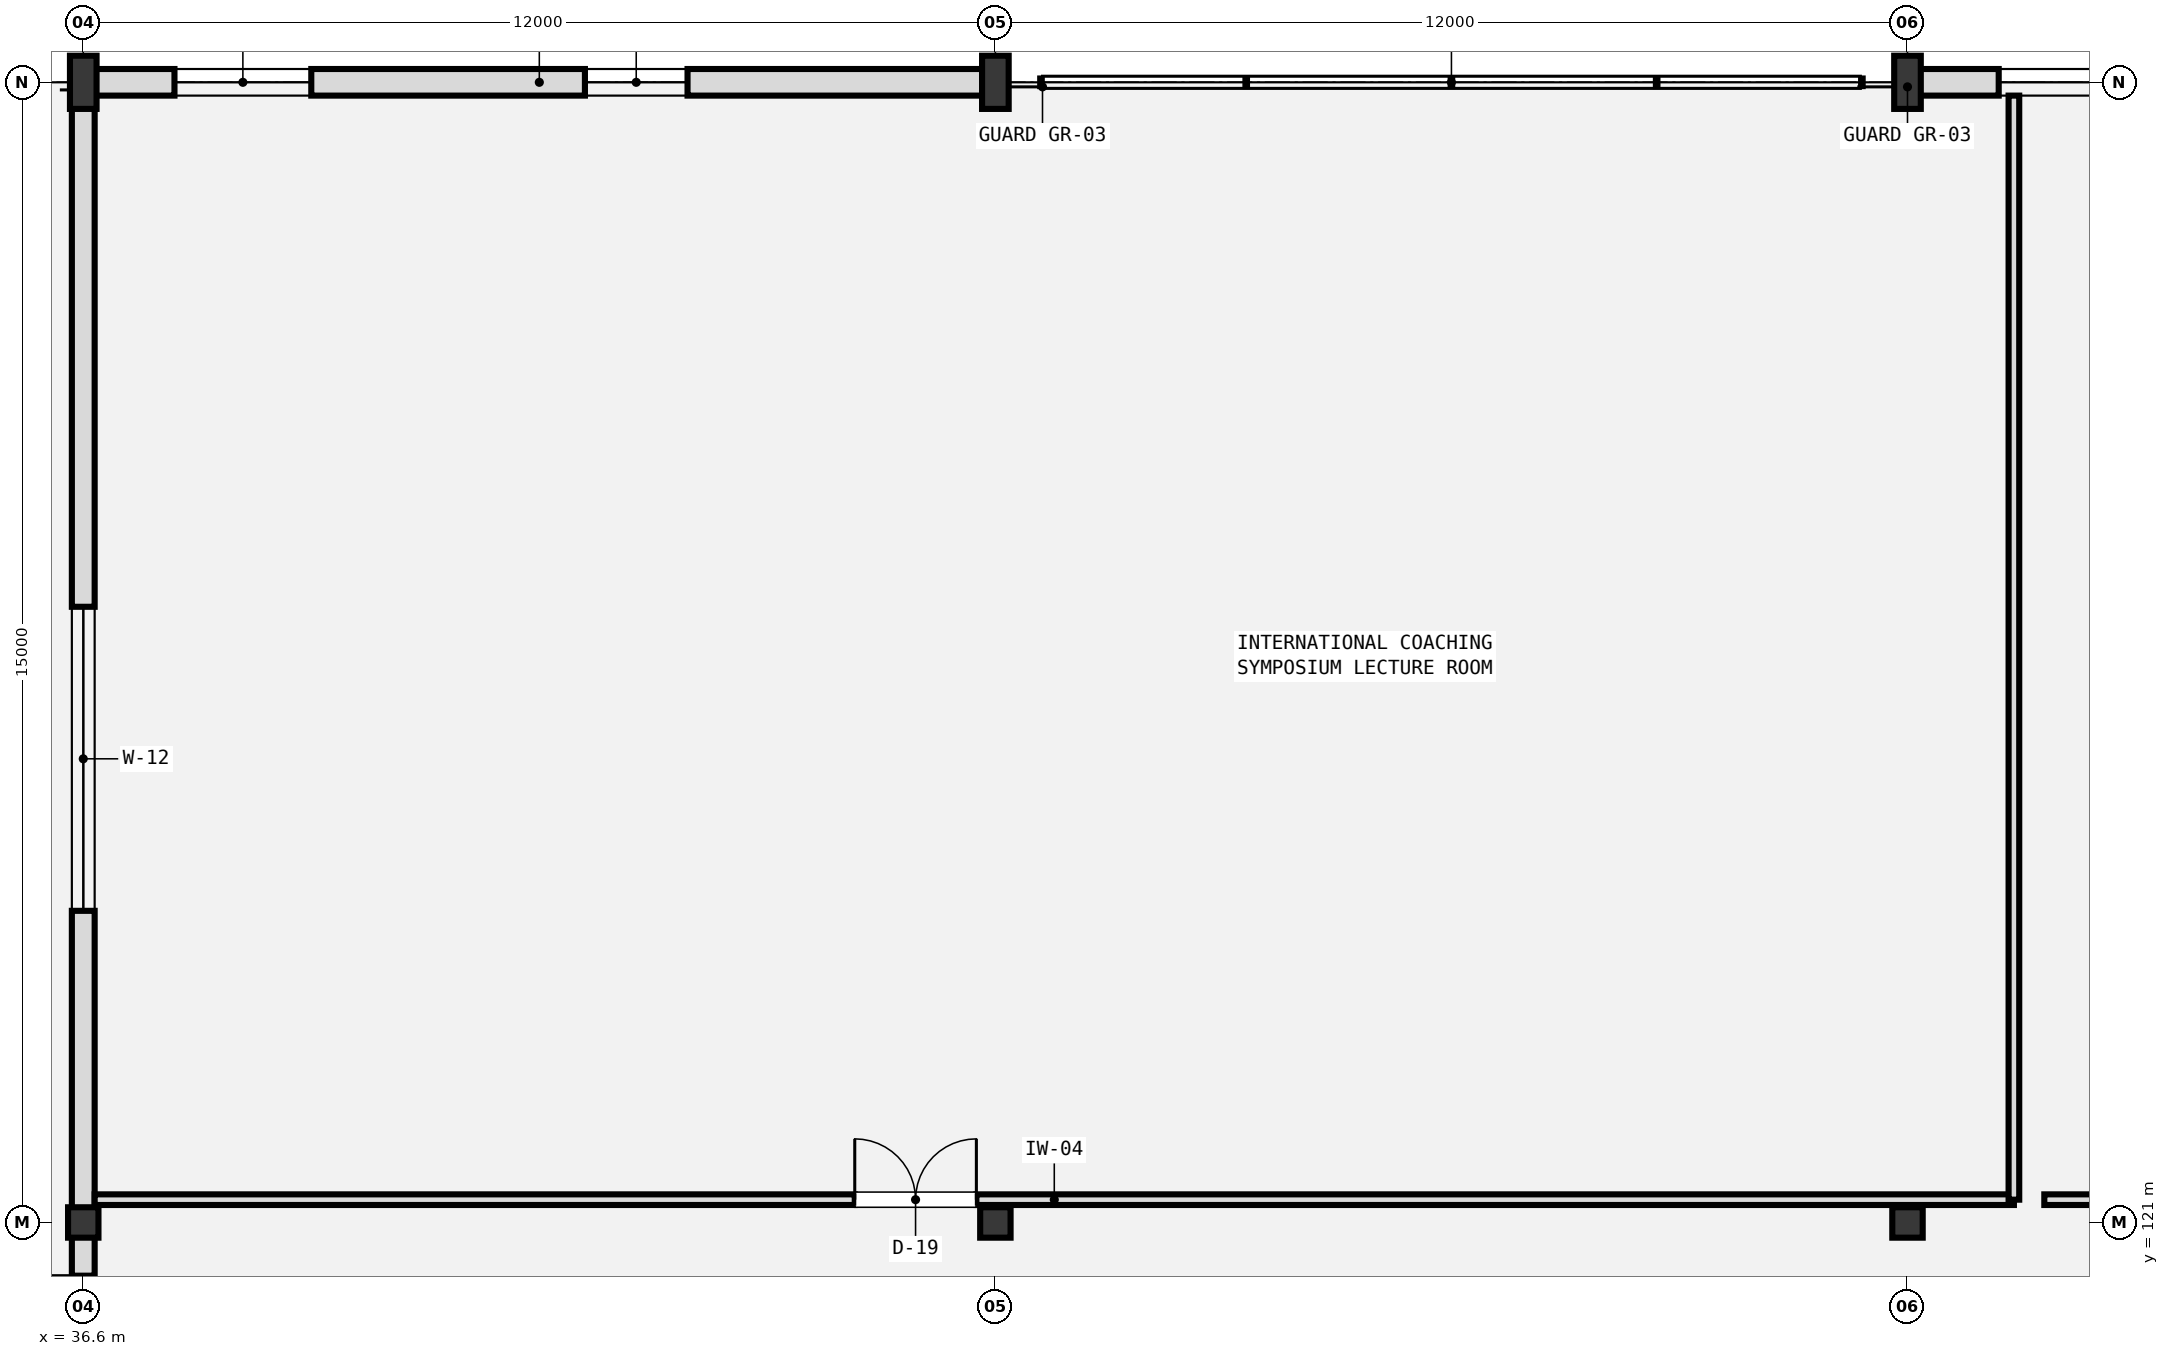
"""IFC4 building model, lengths in metres.
Left out: names, types, materials, properties, quantities, classifications, styles, units other than length and angle.
Written with IfcOpenShell. Run it as: python <this file> out.ifc"""

import sys

from ifc_helpers import new_model, si_unit, direction, frame, frame_2d, origin, origin_2d, place, context, subcontext, project, spatial, rectangle, extrude, element, fill, save


model = new_model("IFC4")
c1 = context("Model", 3, precision=1e-05, world=origin(), true_north=direction((0.0, 1.0)))
c2 = subcontext(c1, "Body", "Model", "MODEL_VIEW")
j1 = project(units=[si_unit("LENGTHUNIT", "METRE"), si_unit("PLANEANGLEUNIT", "RADIAN")], contexts=[c1])
p1 = place(None, origin())
s1 = spatial("IfcSite", under=j1, at=p1, CompositionType="ELEMENT")
p2 = place(p1, origin())
s2 = spatial("IfcBuilding", under=s1, at=p2, CompositionType="ELEMENT")
p3 = place(p2, frame((0.0, 0.0, 14.4)))
s3 = spatial("IfcBuildingStorey", under=s2, at=p3, CompositionType="ELEMENT", Elevation=14.4)
p4 = place(p3, frame((36.6, 121.0, 0.0), z_axis=(0.0, 0.0, 1.0), x_axis=(1.0, 0.0, 0.0)))
e1 = element("IfcColumn", 1, at=p4, inside=s3, PredefinedType="COLUMN", context=c2, shape_type="SweptSolid", body=[
    extrude(rectangle(XDim=0.4, YDim=0.4, at=origin_2d()), origin(), (0.0, 0.0, 1.0), 3.86),
])
p5 = place(p3, frame((36.6, 136.0, 0.0), z_axis=(0.0, 0.0, 1.0), x_axis=(1.0, 0.0, 0.0)))
e2 = element("IfcColumn", 2, at=p5, inside=s3, PredefinedType="COLUMN", context=c2, shape_type="SweptSolid", body=[
    extrude(rectangle(XDim=0.35, YDim=0.7, at=origin_2d()), origin(), (0.0, 0.0, 1.0), 3.86),
])
p6 = place(p3, frame((48.6, 121.0, 0.0), z_axis=(0.0, 0.0, 1.0), x_axis=(1.0, 0.0, 0.0)))
e3 = element("IfcColumn", 3, at=p6, inside=s3, PredefinedType="COLUMN", context=c2, shape_type="SweptSolid", body=[
    extrude(rectangle(XDim=0.4, YDim=0.4, at=origin_2d()), origin(), (0.0, 0.0, 1.0), 4.2),
])
p7 = place(p3, frame((48.6, 136.0, 0.0), z_axis=(0.0, 0.0, 1.0), x_axis=(1.0, 0.0, 0.0)))
e4 = element("IfcColumn", 4, at=p7, inside=s3, PredefinedType="COLUMN", context=c2, shape_type="SweptSolid", body=[
    extrude(rectangle(XDim=0.35, YDim=0.7, at=origin_2d()), origin(), (0.0, 0.0, 1.0), 4.2),
])
p8 = place(p3, frame((60.6, 121.0, 0.0), z_axis=(0.0, 0.0, 1.0), x_axis=(1.0, 0.0, 0.0)))
e5 = element("IfcColumn", 5, at=p8, inside=s3, PredefinedType="COLUMN", context=c2, shape_type="SweptSolid", body=[
    extrude(rectangle(XDim=0.4, YDim=0.4, at=origin_2d()), origin(), (0.0, 0.0, 1.0), 4.2),
])
p9 = place(p3, frame((60.6, 136.0, 0.0), z_axis=(0.0, 0.0, 1.0), x_axis=(1.0, 0.0, 0.0)))
e6 = element("IfcColumn", 6, at=p9, inside=s3, PredefinedType="COLUMN", context=c2, shape_type="SweptSolid", body=[
    extrude(rectangle(XDim=0.35, YDim=0.7, at=origin_2d()), origin(), (0.0, 0.0, 1.0), 4.2),
])
p10 = place(p3, frame((36.6, 136.0, 0.0), z_axis=(0.0, 0.0, 1.0), x_axis=(1.0, 0.0, 0.0)))
e7 = element("IfcWall", 7, at=p10, inside=s3, PredefinedType="SOLIDWALL", context=c2, shape_type="SweptSolid", body=[
    extrude(rectangle(XDim=12.0, YDim=0.35, at=frame_2d((6.0, 0.0))), origin(), (0.0, 0.0, 1.0), 3.51),
])
p11 = place(p10, frame((1.2, 0.0, 0.95)))
e8 = element("IfcOpeningElement", 8, at=p11, cuts=e7, PredefinedType="OPENING", context=c2, shape_type="SweptSolid", body=[
    extrude(rectangle(XDim=1.8, YDim=1.65, at=frame_2d((0.9, 0.825))), frame((0.0, 0.185, 0.0), z_axis=(0.0, -1.0, 0.0), x_axis=(1.0, 0.0, 0.0)), (0.0, 0.0, 1.0), 0.37),
])
p12 = place(p10, frame((6.6, 0.0, 0.95)))
e9 = element("IfcOpeningElement", 9, at=p12, cuts=e7, PredefinedType="OPENING", context=c2, shape_type="SweptSolid", body=[
    extrude(rectangle(XDim=1.35, YDim=1.65, at=frame_2d((0.675, 0.825))), frame((0.0, 0.185, 0.0), z_axis=(0.0, -1.0, 0.0), x_axis=(1.0, 0.0, 0.0)), (0.0, 0.0, 1.0), 0.37),
])
p13 = place(p3, frame((60.6, 136.0, 0.0), z_axis=(0.0, 0.0, 1.0), x_axis=(1.0, 0.0, 0.0)))
e10 = element("IfcWall", 10, at=p13, inside=s3, PredefinedType="SOLIDWALL", context=c2, shape_type="SweptSolid", body=[
    extrude(rectangle(XDim=12.0, YDim=0.35, at=frame_2d((6.0, 0.0))), origin(), (0.0, 0.0, 1.0), 3.51),
])
p14 = place(p13, frame((1.2, 0.0, 0.95)))
e11 = element("IfcOpeningElement", 11, at=p14, cuts=e10, PredefinedType="OPENING", context=c2, shape_type="SweptSolid", body=[
    extrude(rectangle(XDim=4.4, YDim=1.4, at=frame_2d((2.2, 0.7))), frame((0.0, 0.185, 0.0), z_axis=(0.0, -1.0, 0.0), x_axis=(1.0, 0.0, 0.0)), (0.0, 0.0, 1.0), 0.37),
])
p15 = place(p13, frame((6.6, 0.0, 0.95)))
e12 = element("IfcOpeningElement", 12, at=p15, cuts=e10, PredefinedType="OPENING", context=c2, shape_type="SweptSolid", body=[
    extrude(rectangle(XDim=3.4, YDim=1.4, at=frame_2d((1.7, 0.7))), frame((0.0, 0.185, 0.0), z_axis=(0.0, -1.0, 0.0), x_axis=(1.0, 0.0, 0.0)), (0.0, 0.0, 1.0), 0.37),
])
p16 = place(p3, frame((36.6, 108.6, 0.0), z_axis=(0.0, 0.0, 1.0), x_axis=(0.0, 1.0, 0.0)))
e13 = element("IfcWall", 13, at=p16, inside=s3, PredefinedType="SOLIDWALL", context=c2, shape_type="SweptSolid", body=[
    extrude(rectangle(XDim=27.4, YDim=0.3, at=frame_2d((13.7, 0.0))), origin(), (0.0, 0.0, 1.0), 3.36),
])
p17 = place(p16, frame((10.2, 0.0, 0.0)))
e14 = element("IfcOpeningElement", 14, at=p17, cuts=e13, PredefinedType="OPENING", context=c2, shape_type="SweptSolid", body=[
    extrude(rectangle(XDim=1.5, YDim=2.2, at=frame_2d((0.75, 1.1))), frame((0.0, 0.16, 0.0), z_axis=(0.0, -1.0, 0.0), x_axis=(1.0, 0.0, 0.0)), (0.0, 0.0, 1.0), 0.32),
])
p18 = place(p16, frame((2.5, 0.0, 0.85)))
e15 = element("IfcOpeningElement", 15, at=p18, cuts=e13, PredefinedType="OPENING", context=c2, shape_type="SweptSolid", body=[
    extrude(rectangle(XDim=2.8, YDim=1.5, at=frame_2d((1.4, 0.75))), frame((0.0, 0.16, 0.0), z_axis=(0.0, -1.0, 0.0), x_axis=(1.0, 0.0, 0.0)), (0.0, 0.0, 1.0), 0.32),
])
p19 = place(p16, frame((16.5, 0.0, 0.85)))
e16 = element("IfcOpeningElement", 16, at=p19, cuts=e13, PredefinedType="OPENING", context=c2, shape_type="SweptSolid", body=[
    extrude(rectangle(XDim=4.0, YDim=1.5, at=frame_2d((2.0, 0.75))), frame((0.0, 0.16, 0.0), z_axis=(0.0, -1.0, 0.0), x_axis=(1.0, 0.0, 0.0)), (0.0, 0.0, 1.0), 0.32),
])
p20 = place(p3, frame((36.75, 121.3, 0.0), z_axis=(0.0, 0.0, 1.0), x_axis=(1.0, 0.0, 0.0)))
e17 = element("IfcWall", 17, at=p20, inside=s3, PredefinedType="PARTITIONING", context=c2, shape_type="SweptSolid", body=[
    extrude(rectangle(XDim=25.25, YDim=0.14, at=frame_2d((12.625, 0.0))), origin(), (0.0, 0.0, 1.0), 2.75),
])
p21 = place(p20, frame((10.0, 0.0, 0.0)))
e18 = element("IfcOpeningElement", 18, at=p21, cuts=e17, PredefinedType="OPENING", context=c2, shape_type="SweptSolid", body=[
    extrude(rectangle(XDim=1.6, YDim=2.2, at=frame_2d((0.8, 1.1))), frame((0.0, 0.08, 0.0), z_axis=(0.0, -1.0, 0.0), x_axis=(1.0, 0.0, 0.0)), (0.0, 0.0, 1.0), 0.16),
])
p22 = place(p3, frame((62.0, 121.3, 0.0), z_axis=(0.0, 0.0, 1.0), x_axis=(0.0, 1.0, 0.0)))
e19 = element("IfcWall", 19, at=p22, inside=s3, PredefinedType="PARTITIONING", context=c2, shape_type="SweptSolid", body=[
    extrude(rectangle(XDim=14.525, YDim=0.14, at=frame_2d((7.262, 0.0))), origin(), (0.0, 0.0, 1.0), 2.75),
])
p23 = place(p3, frame((62.4, 121.3, 0.0), z_axis=(0.0, 0.0, 1.0), x_axis=(1.0, 0.0, 0.0)))
e20 = element("IfcWall", 20, at=p23, inside=s3, PredefinedType="PARTITIONING", context=c2, shape_type="SweptSolid", body=[
    extrude(rectangle(XDim=21.6, YDim=0.14, at=frame_2d((10.8, 0.0))), origin(), (0.0, 0.0, 1.0), 2.75),
])
p24 = place(p23, frame((9.0, 0.0, 0.0)))
e21 = element("IfcOpeningElement", 21, at=p24, cuts=e20, PredefinedType="OPENING", context=c2, shape_type="SweptSolid", body=[
    extrude(rectangle(XDim=1.1, YDim=2.2, at=frame_2d((0.55, 1.1))), frame((0.0, 0.08, 0.0), z_axis=(0.0, -1.0, 0.0), x_axis=(1.0, 0.0, 0.0)), (0.0, 0.0, 1.0), 0.16),
])
p25 = place(p11, origin())
e22 = element("IfcWindow", 22, at=p25, inside=s3, PartitioningType="SINGLE_PANEL", PredefinedType="WINDOW", context=c2, shape_type="SweptSolid", body=[
    extrude(rectangle(XDim=1.8, YDim=1.65, at=frame_2d((0.9, 0.825))), frame((0.0, 0.03, 0.0), z_axis=(0.0, -1.0, 0.0), x_axis=(1.0, 0.0, 0.0)), (0.0, 0.0, 1.0), 0.06),
])
fill(e8, e22)
p26 = place(p12, origin())
e23 = element("IfcWindow", 23, at=p26, inside=s3, PartitioningType="SINGLE_PANEL", PredefinedType="WINDOW", context=c2, shape_type="SweptSolid", body=[
    extrude(rectangle(XDim=1.35, YDim=1.65, at=frame_2d((0.675, 0.825))), frame((0.0, 0.03, 0.0), z_axis=(0.0, -1.0, 0.0), x_axis=(1.0, 0.0, 0.0)), (0.0, 0.0, 1.0), 0.06),
])
fill(e9, e23)
p27 = place(p14, origin())
e24 = element("IfcWindow", 24, at=p27, inside=s3, PartitioningType="TRIPLE_PANEL_HORIZONTAL", PredefinedType="WINDOW", context=c2, shape_type="SweptSolid", body=[
    extrude(rectangle(XDim=4.4, YDim=1.4, at=frame_2d((2.2, 0.7))), frame((0.0, 0.03, 0.0), z_axis=(0.0, -1.0, 0.0), x_axis=(1.0, 0.0, 0.0)), (0.0, 0.0, 1.0), 0.06),
])
fill(e11, e24)
p28 = place(p19, origin())
e25 = element("IfcWindow", 25, at=p28, inside=s3, PartitioningType="TRIPLE_PANEL_HORIZONTAL", PredefinedType="WINDOW", context=c2, shape_type="SweptSolid", body=[
    extrude(rectangle(XDim=4.0, YDim=1.5, at=frame_2d((2.0, 0.75))), frame((0.0, 0.03, 0.0), z_axis=(0.0, -1.0, 0.0), x_axis=(1.0, 0.0, 0.0)), (0.0, 0.0, 1.0), 0.06),
])
fill(e16, e25)
p29 = place(p21, origin())
e26 = element("IfcDoor", 26, at=p29, inside=s3, OperationType="DOUBLE_DOOR_SINGLE_SWING", PredefinedType="DOOR", context=c2, shape_type="SweptSolid", body=[
    extrude(rectangle(XDim=1.6, YDim=2.2, at=frame_2d((0.8, 1.1))), frame((0.0, 0.025, 0.0), z_axis=(0.0, -1.0, 0.0), x_axis=(1.0, 0.0, 0.0)), (0.0, 0.0, 1.0), 0.05),
])
fill(e18, e26)
save(model, sys.argv[1])
